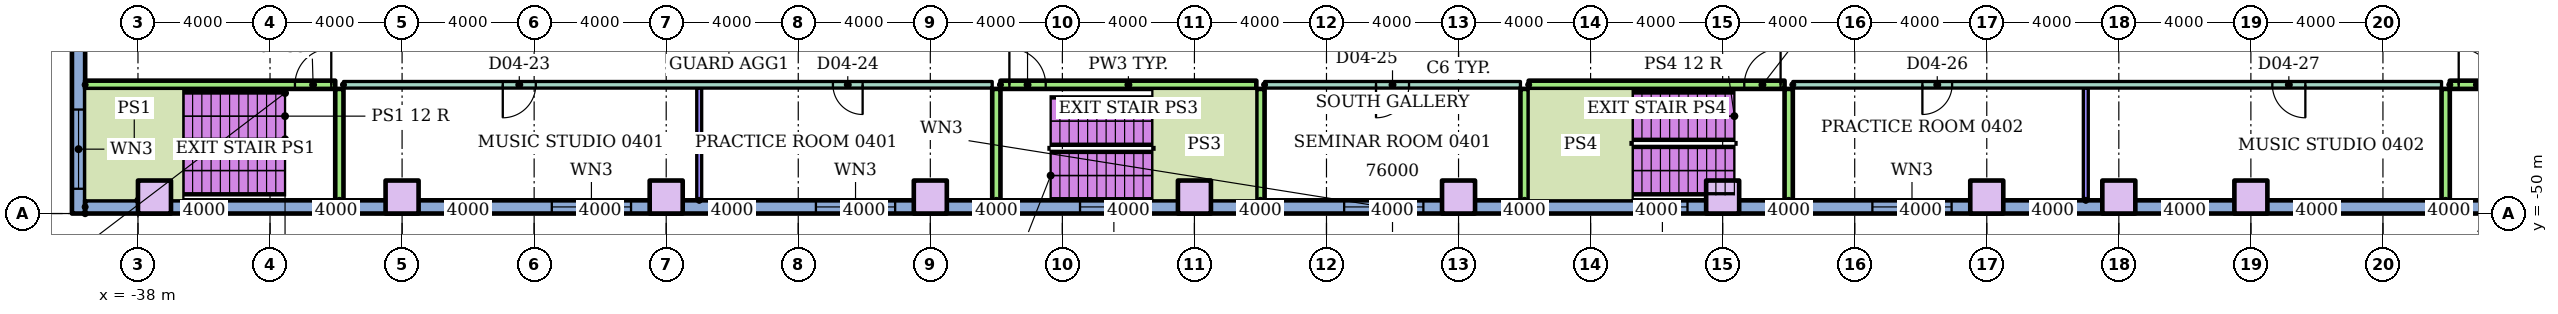
"""IFC4 building model, lengths in metres.
Left out: names, types, materials, properties, quantities, classifications, styles, units other than length and angle.
Written with IfcOpenShell. Run it as: python <this file> out.ifc"""

import sys

from ifc_helpers import new_model, si_unit, direction, frame, frame_2d, origin, origin_2d, place, context, subcontext, project, spatial, rectangle, extrude, element, fill, save


model = new_model("IFC4")
c1 = context("Model", 3, precision=1e-05, world=origin(), true_north=direction((0.0, 1.0)))
c2 = subcontext(c1, "Body", "Model", "MODEL_VIEW")
j1 = project(units=[si_unit("LENGTHUNIT", "METRE"), si_unit("PLANEANGLEUNIT", "RADIAN")], contexts=[c1])
p1 = place(None, origin())
s1 = spatial("IfcSite", under=j1, at=p1, CompositionType="ELEMENT")
p2 = place(p1, origin())
s2 = spatial("IfcBuilding", under=s1, at=p2, CompositionType="ELEMENT")
p3 = place(p2, frame((0.0, 0.0, 18.0)))
s3 = spatial("IfcBuildingStorey", under=s2, at=p3, CompositionType="ELEMENT", Elevation=18.0)
for number, where in (
    (1, (-37.5, -49.5, 0.0)),
    (2, (-30.0, -49.5, 0.0)),
    (3, (-22.0, -49.5, 0.0)),
    (4, (-14.0, -49.5, 0.0)),
    (5, (-6.0, -49.5, 0.0)),
    (6, (2.0, -49.5, 0.0)),
    (7, (10.0, -49.5, 0.0)),
    (8, (18.0, -49.5, 0.0)),
    (9, (22.0, -49.5, 0.0)),
    (10, (26.0, -49.5, 0.0)),
):
    element("IfcColumn", number, at=place(p3, frame(where)), inside=s3, PredefinedType="COLUMN", context=c2, shape_type="SweptSolid", body=[
        extrude(rectangle(XDim=1.0, YDim=1.0, at=origin_2d()), origin(), (0.0, 0.0, 1.0), 4.0),
    ])
p4 = place(p3, frame((-39.8, 20.0, 0.0), z_axis=(0.0, 0.0, 1.0), x_axis=(0.0, -1.0, 0.0)))
e11 = element("IfcWall", 11, at=p4, inside=s3, PredefinedType="STANDARD", context=c2, shape_type="SweptSolid", body=[
    extrude(rectangle(XDim=70.0, YDim=0.4, at=frame_2d((35.0, 0.0))), origin(), (0.0, 0.0, 1.0), 3.7),
])
p5 = place(p4, frame((1.05, 0.0, 0.9)))
e12 = element("IfcOpeningElement", 12, at=p5, cuts=e11, PredefinedType="OPENING", context=c2, shape_type="SweptSolid", body=[
    extrude(rectangle(XDim=2.4, YDim=2.1, at=frame_2d((1.2, 1.05))), frame((0.0, 0.21, 0.0), z_axis=(0.0, -1.0, 0.0), x_axis=(1.0, 0.0, 0.0)), (0.0, 0.0, 1.0), 0.42),
])
p6 = place(p4, frame((5.55, 0.0, 0.9)))
e13 = element("IfcOpeningElement", 13, at=p6, cuts=e11, PredefinedType="OPENING", context=c2, shape_type="SweptSolid", body=[
    extrude(rectangle(XDim=2.4, YDim=2.1, at=frame_2d((1.2, 1.05))), frame((0.0, 0.21, 0.0), z_axis=(0.0, -1.0, 0.0), x_axis=(1.0, 0.0, 0.0)), (0.0, 0.0, 1.0), 0.42),
])
p7 = place(p4, frame((9.863, 0.0, 0.9)))
e14 = element("IfcOpeningElement", 14, at=p7, cuts=e11, PredefinedType="OPENING", context=c2, shape_type="SweptSolid", body=[
    extrude(rectangle(XDim=2.4, YDim=2.1, at=frame_2d((1.2, 1.05))), frame((0.0, 0.21, 0.0), z_axis=(0.0, -1.0, 0.0), x_axis=(1.0, 0.0, 0.0)), (0.0, 0.0, 1.0), 0.42),
])
p8 = place(p4, frame((13.988, 0.0, 0.9)))
e15 = element("IfcOpeningElement", 15, at=p8, cuts=e11, PredefinedType="OPENING", context=c2, shape_type="SweptSolid", body=[
    extrude(rectangle(XDim=2.4, YDim=2.1, at=frame_2d((1.2, 1.05))), frame((0.0, 0.21, 0.0), z_axis=(0.0, -1.0, 0.0), x_axis=(1.0, 0.0, 0.0)), (0.0, 0.0, 1.0), 0.42),
])
p9 = place(p4, frame((18.113, 0.0, 0.9)))
e16 = element("IfcOpeningElement", 16, at=p9, cuts=e11, PredefinedType="OPENING", context=c2, shape_type="SweptSolid", body=[
    extrude(rectangle(XDim=2.4, YDim=2.1, at=frame_2d((1.2, 1.05))), frame((0.0, 0.21, 0.0), z_axis=(0.0, -1.0, 0.0), x_axis=(1.0, 0.0, 0.0)), (0.0, 0.0, 1.0), 0.42),
])
p10 = place(p4, frame((22.238, 0.0, 0.9)))
e17 = element("IfcOpeningElement", 17, at=p10, cuts=e11, PredefinedType="OPENING", context=c2, shape_type="SweptSolid", body=[
    extrude(rectangle(XDim=2.4, YDim=2.1, at=frame_2d((1.2, 1.05))), frame((0.0, 0.21, 0.0), z_axis=(0.0, -1.0, 0.0), x_axis=(1.0, 0.0, 0.0)), (0.0, 0.0, 1.0), 0.42),
])
p11 = place(p4, frame((26.363, 0.0, 0.9)))
e18 = element("IfcOpeningElement", 18, at=p11, cuts=e11, PredefinedType="OPENING", context=c2, shape_type="SweptSolid", body=[
    extrude(rectangle(XDim=2.4, YDim=2.1, at=frame_2d((1.2, 1.05))), frame((0.0, 0.21, 0.0), z_axis=(0.0, -1.0, 0.0), x_axis=(1.0, 0.0, 0.0)), (0.0, 0.0, 1.0), 0.42),
])
p12 = place(p4, frame((30.488, 0.0, 0.9)))
e19 = element("IfcOpeningElement", 19, at=p12, cuts=e11, PredefinedType="OPENING", context=c2, shape_type="SweptSolid", body=[
    extrude(rectangle(XDim=2.4, YDim=2.1, at=frame_2d((1.2, 1.05))), frame((0.0, 0.21, 0.0), z_axis=(0.0, -1.0, 0.0), x_axis=(1.0, 0.0, 0.0)), (0.0, 0.0, 1.0), 0.42),
])
p13 = place(p4, frame((34.613, 0.0, 0.9)))
e20 = element("IfcOpeningElement", 20, at=p13, cuts=e11, PredefinedType="OPENING", context=c2, shape_type="SweptSolid", body=[
    extrude(rectangle(XDim=2.4, YDim=2.1, at=frame_2d((1.2, 1.05))), frame((0.0, 0.21, 0.0), z_axis=(0.0, -1.0, 0.0), x_axis=(1.0, 0.0, 0.0)), (0.0, 0.0, 1.0), 0.42),
])
p14 = place(p4, frame((38.738, 0.0, 0.9)))
e21 = element("IfcOpeningElement", 21, at=p14, cuts=e11, PredefinedType="OPENING", context=c2, shape_type="SweptSolid", body=[
    extrude(rectangle(XDim=2.4, YDim=2.1, at=frame_2d((1.2, 1.05))), frame((0.0, 0.21, 0.0), z_axis=(0.0, -1.0, 0.0), x_axis=(1.0, 0.0, 0.0)), (0.0, 0.0, 1.0), 0.42),
])
p15 = place(p4, frame((54.05, 0.0, 0.9)))
e22 = element("IfcOpeningElement", 22, at=p15, cuts=e11, PredefinedType="OPENING", context=c2, shape_type="SweptSolid", body=[
    extrude(rectangle(XDim=2.4, YDim=2.1, at=frame_2d((1.2, 1.05))), frame((0.0, 0.21, 0.0), z_axis=(0.0, -1.0, 0.0), x_axis=(1.0, 0.0, 0.0)), (0.0, 0.0, 1.0), 0.42),
])
p16 = place(p4, frame((57.55, 0.0, 0.9)))
e23 = element("IfcOpeningElement", 23, at=p16, cuts=e11, PredefinedType="OPENING", context=c2, shape_type="SweptSolid", body=[
    extrude(rectangle(XDim=2.4, YDim=2.1, at=frame_2d((1.2, 1.05))), frame((0.0, 0.21, 0.0), z_axis=(0.0, -1.0, 0.0), x_axis=(1.0, 0.0, 0.0)), (0.0, 0.0, 1.0), 0.42),
])
p17 = place(p4, frame((61.05, 0.0, 0.9)))
e24 = element("IfcOpeningElement", 24, at=p17, cuts=e11, PredefinedType="OPENING", context=c2, shape_type="SweptSolid", body=[
    extrude(rectangle(XDim=2.4, YDim=2.1, at=frame_2d((1.2, 1.05))), frame((0.0, 0.21, 0.0), z_axis=(0.0, -1.0, 0.0), x_axis=(1.0, 0.0, 0.0)), (0.0, 0.0, 1.0), 0.42),
])
p18 = place(p4, frame((66.85, 0.0, 0.9)))
e25 = element("IfcOpeningElement", 25, at=p18, cuts=e11, PredefinedType="OPENING", context=c2, shape_type="SweptSolid", body=[
    extrude(rectangle(XDim=2.4, YDim=2.1, at=frame_2d((1.2, 1.05))), frame((0.0, 0.21, 0.0), z_axis=(0.0, -1.0, 0.0), x_axis=(1.0, 0.0, 0.0)), (0.0, 0.0, 1.0), 0.42),
])
p19 = place(p3, frame((-39.6, -49.8, 0.0)))
e26 = element("IfcWall", 26, at=p19, inside=s3, PredefinedType="STANDARD", context=c2, shape_type="SweptSolid", body=[
    extrude(rectangle(XDim=79.2, YDim=0.4, at=frame_2d((39.6, 0.0))), origin(), (0.0, 0.0, 1.0), 3.7),
])
p20 = place(p19, frame((14.135, 0.0, 0.9)))
e27 = element("IfcOpeningElement", 27, at=p20, cuts=e26, PredefinedType="OPENING", context=c2, shape_type="SweptSolid", body=[
    extrude(rectangle(XDim=2.4, YDim=2.1, at=frame_2d((1.2, 1.05))), frame((0.0, 0.21, 0.0), z_axis=(0.0, -1.0, 0.0), x_axis=(1.0, 0.0, 0.0)), (0.0, 0.0, 1.0), 0.42),
])
p21 = place(p19, frame((22.135, 0.0, 0.9)))
e28 = element("IfcOpeningElement", 28, at=p21, cuts=e26, PredefinedType="OPENING", context=c2, shape_type="SweptSolid", body=[
    extrude(rectangle(XDim=2.4, YDim=2.1, at=frame_2d((1.2, 1.05))), frame((0.0, 0.21, 0.0), z_axis=(0.0, -1.0, 0.0), x_axis=(1.0, 0.0, 0.0)), (0.0, 0.0, 1.0), 0.42),
])
p22 = place(p19, frame((30.135, 0.0, 0.9)))
e29 = element("IfcOpeningElement", 29, at=p22, cuts=e26, PredefinedType="OPENING", context=c2, shape_type="SweptSolid", body=[
    extrude(rectangle(XDim=2.05, YDim=2.1, at=frame_2d((1.025, 1.05))), frame((0.0, 0.21, 0.0), z_axis=(0.0, -1.0, 0.0), x_axis=(1.0, 0.0, 0.0)), (0.0, 0.0, 1.0), 0.42),
])
p23 = place(p19, frame((38.135, 0.0, 0.9)))
e30 = element("IfcOpeningElement", 30, at=p23, cuts=e26, PredefinedType="OPENING", context=c2, shape_type="SweptSolid", body=[
    extrude(rectangle(XDim=2.4, YDim=2.1, at=frame_2d((1.2, 1.05))), frame((0.0, 0.21, 0.0), z_axis=(0.0, -1.0, 0.0), x_axis=(1.0, 0.0, 0.0)), (0.0, 0.0, 1.0), 0.42),
])
p24 = place(p19, frame((47.015, 0.0, 0.9)))
e31 = element("IfcOpeningElement", 31, at=p24, cuts=e26, PredefinedType="OPENING", context=c2, shape_type="SweptSolid", body=[
    extrude(rectangle(XDim=1.52, YDim=2.1, at=frame_2d((0.76, 1.05))), frame((0.0, 0.21, 0.0), z_axis=(0.0, -1.0, 0.0), x_axis=(1.0, 0.0, 0.0)), (0.0, 0.0, 1.0), 0.42),
])
p25 = place(p19, frame((54.135, 0.0, 0.9)))
e32 = element("IfcOpeningElement", 32, at=p25, cuts=e26, PredefinedType="OPENING", context=c2, shape_type="SweptSolid", body=[
    extrude(rectangle(XDim=2.4, YDim=2.1, at=frame_2d((1.2, 1.05))), frame((0.0, 0.21, 0.0), z_axis=(0.0, -1.0, 0.0), x_axis=(1.0, 0.0, 0.0)), (0.0, 0.0, 1.0), 0.42),
])
p26 = place(p3, frame((-31.775, -46.1, 0.0)))
e33 = element("IfcWall", 33, at=p26, inside=s3, PredefinedType="PARTITIONING", context=c2, shape_type="SweptSolid", body=[
    extrude(rectangle(XDim=19.65, YDim=0.2, at=frame_2d((9.825, 0.0))), origin(), (0.0, 0.0, 1.0), 3.7),
])
p27 = place(p26, frame((4.825, 0.0, 0.0)))
e34 = element("IfcOpeningElement", 34, at=p27, cuts=e33, PredefinedType="OPENING", context=c2, shape_type="SweptSolid", body=[
    extrude(rectangle(XDim=1.0, YDim=2.1, at=frame_2d((0.5, 1.05))), frame((0.0, 0.11, 0.0), z_axis=(0.0, -1.0, 0.0), x_axis=(1.0, 0.0, 0.0)), (0.0, 0.0, 1.0), 0.22),
])
p28 = place(p26, frame((14.825, 0.0, 0.0)))
e35 = element("IfcOpeningElement", 35, at=p28, cuts=e33, PredefinedType="OPENING", context=c2, shape_type="SweptSolid", body=[
    extrude(rectangle(XDim=0.9, YDim=2.1, at=frame_2d((0.45, 1.05))), frame((0.0, 0.11, 0.0), z_axis=(0.0, -1.0, 0.0), x_axis=(1.0, 0.0, 0.0)), (0.0, 0.0, 1.0), 0.22),
])
p29 = place(p3, frame((-3.875, -46.1, 0.0)))
e36 = element("IfcWall", 36, at=p29, inside=s3, PredefinedType="PARTITIONING", context=c2, shape_type="SweptSolid", body=[
    extrude(rectangle(XDim=7.75, YDim=0.2, at=frame_2d((3.875, 0.0))), origin(), (0.0, 0.0, 1.0), 3.7),
])
p30 = place(p29, frame((3.375, 0.0, 0.0)))
e37 = element("IfcOpeningElement", 37, at=p30, cuts=e36, PredefinedType="OPENING", context=c2, shape_type="SweptSolid", body=[
    extrude(rectangle(XDim=1.0, YDim=2.1, at=frame_2d((0.5, 1.05))), frame((0.0, 0.11, 0.0), z_axis=(0.0, -1.0, 0.0), x_axis=(1.0, 0.0, 0.0)), (0.0, 0.0, 1.0), 0.22),
])
p31 = place(p3, frame((12.125, -46.1, 0.0)))
e38 = element("IfcWall", 38, at=p31, inside=s3, PredefinedType="PARTITIONING", context=c2, shape_type="SweptSolid", body=[
    extrude(rectangle(XDim=19.65, YDim=0.2, at=frame_2d((9.825, 0.0))), origin(), (0.0, 0.0, 1.0), 3.7),
])
p32 = place(p31, frame((3.925, 0.0, 0.0)))
e39 = element("IfcOpeningElement", 39, at=p32, cuts=e38, PredefinedType="OPENING", context=c2, shape_type="SweptSolid", body=[
    extrude(rectangle(XDim=0.9, YDim=2.1, at=frame_2d((0.45, 1.05))), frame((0.0, 0.11, 0.0), z_axis=(0.0, -1.0, 0.0), x_axis=(1.0, 0.0, 0.0)), (0.0, 0.0, 1.0), 0.22),
])
p33 = place(p31, frame((14.525, 0.0, 0.0)))
e40 = element("IfcOpeningElement", 40, at=p33, cuts=e38, PredefinedType="OPENING", context=c2, shape_type="SweptSolid", body=[
    extrude(rectangle(XDim=1.0, YDim=2.1, at=frame_2d((0.5, 1.05))), frame((0.0, 0.11, 0.0), z_axis=(0.0, -1.0, 0.0), x_axis=(1.0, 0.0, 0.0)), (0.0, 0.0, 1.0), 0.22),
])
p34 = place(p3, frame((-39.6, -46.1, 0.0)))
e41 = element("IfcWall", 41, at=p34, inside=s3, PredefinedType="SOLIDWALL", context=c2, shape_type="SweptSolid", body=[
    extrude(rectangle(XDim=7.575, YDim=0.25, at=frame_2d((3.788, 0.0))), origin(), (0.0, 0.0, 1.0), 3.7),
])
p35 = place(p34, frame((6.355, 0.0, 0.0)))
e42 = element("IfcOpeningElement", 42, at=p35, cuts=e41, PredefinedType="OPENING", context=c2, shape_type="SweptSolid", body=[
    extrude(rectangle(XDim=1.1, YDim=2.1, at=frame_2d((0.55, 1.05))), frame((0.0, 0.135, 0.0), z_axis=(0.0, -1.0, 0.0), x_axis=(1.0, 0.0, 0.0)), (0.0, 0.0, 1.0), 0.27),
])
p36 = place(p3, frame((-11.875, -46.1, 0.0)))
e43 = element("IfcWall", 43, at=p36, inside=s3, PredefinedType="SOLIDWALL", context=c2, shape_type="SweptSolid", body=[
    extrude(rectangle(XDim=7.75, YDim=0.25, at=frame_2d((3.875, 0.0))), origin(), (0.0, 0.0, 1.0), 3.7),
])
p37 = place(p36, frame((0.27, 0.0, 0.0)))
e44 = element("IfcOpeningElement", 44, at=p37, cuts=e43, PredefinedType="OPENING", context=c2, shape_type="SweptSolid", body=[
    extrude(rectangle(XDim=1.1, YDim=2.1, at=frame_2d((0.55, 1.05))), frame((0.0, 0.135, 0.0), z_axis=(0.0, -1.0, 0.0), x_axis=(1.0, 0.0, 0.0)), (0.0, 0.0, 1.0), 0.27),
])
p38 = place(p3, frame((4.125, -46.1, 0.0)))
e45 = element("IfcWall", 45, at=p38, inside=s3, PredefinedType="SOLIDWALL", context=c2, shape_type="SweptSolid", body=[
    extrude(rectangle(XDim=7.75, YDim=0.25, at=frame_2d((3.875, 0.0))), origin(), (0.0, 0.0, 1.0), 3.7),
])
p39 = place(p38, frame((6.53, 0.0, 0.0)))
e46 = element("IfcOpeningElement", 46, at=p39, cuts=e45, PredefinedType="OPENING", context=c2, shape_type="SweptSolid", body=[
    extrude(rectangle(XDim=1.1, YDim=2.1, at=frame_2d((0.55, 1.05))), frame((0.0, 0.135, 0.0), z_axis=(0.0, -1.0, 0.0), x_axis=(1.0, 0.0, 0.0)), (0.0, 0.0, 1.0), 0.27),
])
p40 = place(p3, frame((32.025, -46.1, 0.0)))
e47 = element("IfcWall", 47, at=p40, inside=s3, PredefinedType="SOLIDWALL", context=c2, shape_type="SweptSolid", body=[
    extrude(rectangle(XDim=7.575, YDim=0.25, at=frame_2d((3.788, 0.0))), origin(), (0.0, 0.0, 1.0), 3.7),
])
p41 = place(p40, frame((0.27, 0.0, 0.0)))
e48 = element("IfcOpeningElement", 48, at=p41, cuts=e47, PredefinedType="OPENING", context=c2, shape_type="SweptSolid", body=[
    extrude(rectangle(XDim=1.1, YDim=2.1, at=frame_2d((0.55, 1.05))), frame((0.0, 0.135, 0.0), z_axis=(0.0, -1.0, 0.0), x_axis=(1.0, 0.0, 0.0)), (0.0, 0.0, 1.0), 0.27),
])
p42 = place(p3, frame((-31.9, -49.6, 0.0), z_axis=(0.0, 0.0, 1.0), x_axis=(0.0, 1.0, 0.0)))
e49 = element("IfcWall", 49, at=p42, inside=s3, PredefinedType="SOLIDWALL", context=c2, shape_type="SweptSolid", body=[
    extrude(rectangle(XDim=3.375, YDim=0.25, at=frame_2d((1.688, 0.0))), origin(), (0.0, 0.0, 1.0), 3.7),
])
p43 = place(p3, frame((-21.0, -49.6, 0.0), z_axis=(0.0, 0.0, 1.0), x_axis=(0.0, 1.0, 0.0)))
e50 = element("IfcWall", 50, at=p43, inside=s3, PredefinedType="PARTITIONING", context=c2, shape_type="SweptSolid", body=[
    extrude(rectangle(XDim=3.4, YDim=0.15, at=frame_2d((1.7, 0.0))), origin(), (0.0, 0.0, 1.0), 3.7),
])
for number, where, z_axis, x_axis in (
    (51, (-12.0, -49.6, 0.0), (0.0, 0.0, 1.0), (0.0, 1.0, 0.0)),
    (52, (-4.0, -49.6, 0.0), (0.0, 0.0, 1.0), (0.0, 1.0, 0.0)),
    (53, (4.0, -49.6, 0.0), (0.0, 0.0, 1.0), (0.0, 1.0, 0.0)),
    (54, (12.0, -49.6, 0.0), (0.0, 0.0, 1.0), (0.0, 1.0, 0.0)),
):
    element("IfcWall", number, at=place(p3, frame(where, z_axis=z_axis, x_axis=x_axis)), inside=s3, PredefinedType="SOLIDWALL", context=c2, shape_type="SweptSolid", body=[
        extrude(rectangle(XDim=3.375, YDim=0.25, at=frame_2d((1.688, 0.0))), origin(), (0.0, 0.0, 1.0), 3.7),
    ])
p44 = place(p3, frame((21.0, -49.6, 0.0), z_axis=(0.0, 0.0, 1.0), x_axis=(0.0, 1.0, 0.0)))
e55 = element("IfcWall", 55, at=p44, inside=s3, PredefinedType="PARTITIONING", context=c2, shape_type="SweptSolid", body=[
    extrude(rectangle(XDim=3.4, YDim=0.15, at=frame_2d((1.7, 0.0))), origin(), (0.0, 0.0, 1.0), 3.7),
])
p45 = place(p3, frame((31.9, -49.6, 0.0), z_axis=(0.0, 0.0, 1.0), x_axis=(0.0, 1.0, 0.0)))
e56 = element("IfcWall", 56, at=p45, inside=s3, PredefinedType="SOLIDWALL", context=c2, shape_type="SweptSolid", body=[
    extrude(rectangle(XDim=3.375, YDim=0.25, at=frame_2d((1.688, 0.0))), origin(), (0.0, 0.0, 1.0), 3.7),
])
p46 = place(p18, origin())
e57 = element("IfcWindow", 57, at=p46, inside=s3, PartitioningType="SINGLE_PANEL", PredefinedType="WINDOW", context=c2, shape_type="SweptSolid", body=[
    extrude(rectangle(XDim=2.4, YDim=2.1, at=frame_2d((1.2, 1.05))), frame((0.0, 0.03, 0.0), z_axis=(0.0, -1.0, 0.0), x_axis=(1.0, 0.0, 0.0)), (0.0, 0.0, 1.0), 0.06),
])
fill(e25, e57)
p47 = place(p20, origin())
e58 = element("IfcWindow", 58, at=p47, inside=s3, PartitioningType="SINGLE_PANEL", PredefinedType="WINDOW", context=c2, shape_type="SweptSolid", body=[
    extrude(rectangle(XDim=2.4, YDim=2.1, at=frame_2d((1.2, 1.05))), frame((0.0, 0.03, 0.0), z_axis=(0.0, -1.0, 0.0), x_axis=(1.0, 0.0, 0.0)), (0.0, 0.0, 1.0), 0.06),
])
fill(e27, e58)
p48 = place(p21, origin())
e59 = element("IfcWindow", 59, at=p48, inside=s3, PartitioningType="SINGLE_PANEL", PredefinedType="WINDOW", context=c2, shape_type="SweptSolid", body=[
    extrude(rectangle(XDim=2.4, YDim=2.1, at=frame_2d((1.2, 1.05))), frame((0.0, 0.03, 0.0), z_axis=(0.0, -1.0, 0.0), x_axis=(1.0, 0.0, 0.0)), (0.0, 0.0, 1.0), 0.06),
])
fill(e28, e59)
p49 = place(p22, origin())
e60 = element("IfcWindow", 60, at=p49, inside=s3, PartitioningType="SINGLE_PANEL", PredefinedType="WINDOW", context=c2, shape_type="SweptSolid", body=[
    extrude(rectangle(XDim=2.05, YDim=2.1, at=frame_2d((1.025, 1.05))), frame((0.0, 0.03, 0.0), z_axis=(0.0, -1.0, 0.0), x_axis=(1.0, 0.0, 0.0)), (0.0, 0.0, 1.0), 0.06),
])
fill(e29, e60)
p50 = place(p23, origin())
e61 = element("IfcWindow", 61, at=p50, inside=s3, PartitioningType="SINGLE_PANEL", PredefinedType="WINDOW", context=c2, shape_type="SweptSolid", body=[
    extrude(rectangle(XDim=2.4, YDim=2.1, at=frame_2d((1.2, 1.05))), frame((0.0, 0.03, 0.0), z_axis=(0.0, -1.0, 0.0), x_axis=(1.0, 0.0, 0.0)), (0.0, 0.0, 1.0), 0.06),
])
fill(e30, e61)
p51 = place(p24, origin())
e62 = element("IfcWindow", 62, at=p51, inside=s3, PartitioningType="SINGLE_PANEL", PredefinedType="WINDOW", context=c2, shape_type="SweptSolid", body=[
    extrude(rectangle(XDim=1.52, YDim=2.1, at=frame_2d((0.76, 1.05))), frame((0.0, 0.03, 0.0), z_axis=(0.0, -1.0, 0.0), x_axis=(1.0, 0.0, 0.0)), (0.0, 0.0, 1.0), 0.06),
])
fill(e31, e62)
p52 = place(p25, origin())
e63 = element("IfcWindow", 63, at=p52, inside=s3, PartitioningType="SINGLE_PANEL", PredefinedType="WINDOW", context=c2, shape_type="SweptSolid", body=[
    extrude(rectangle(XDim=2.4, YDim=2.1, at=frame_2d((1.2, 1.05))), frame((0.0, 0.03, 0.0), z_axis=(0.0, -1.0, 0.0), x_axis=(1.0, 0.0, 0.0)), (0.0, 0.0, 1.0), 0.06),
])
fill(e32, e63)
p53 = place(p27, frame((1.0, 0.0, 0.0), z_axis=(0.0, 0.0, 1.0), x_axis=(-1.0, 0.0, 0.0)))
e64 = element("IfcDoor", 64, at=p53, inside=s3, OperationType="SINGLE_SWING_LEFT", PredefinedType="DOOR", context=c2, shape_type="SweptSolid", body=[
    extrude(rectangle(XDim=1.0, YDim=2.1, at=frame_2d((0.5, 1.05))), frame((0.0, 0.025, 0.0), z_axis=(0.0, -1.0, 0.0), x_axis=(1.0, 0.0, 0.0)), (0.0, 0.0, 1.0), 0.05),
])
fill(e34, e64)
p54 = place(p28, frame((0.9, 0.0, 0.0), z_axis=(0.0, 0.0, 1.0), x_axis=(-1.0, 0.0, 0.0)))
e65 = element("IfcDoor", 65, at=p54, inside=s3, OperationType="SINGLE_SWING_RIGHT", PredefinedType="DOOR", context=c2, shape_type="SweptSolid", body=[
    extrude(rectangle(XDim=0.9, YDim=2.1, at=frame_2d((0.45, 1.05))), frame((0.0, 0.025, 0.0), z_axis=(0.0, -1.0, 0.0), x_axis=(1.0, 0.0, 0.0)), (0.0, 0.0, 1.0), 0.05),
])
fill(e35, e65)
p55 = place(p30, frame((1.0, 0.0, 0.0), z_axis=(0.0, 0.0, 1.0), x_axis=(-1.0, 0.0, 0.0)))
e66 = element("IfcDoor", 66, at=p55, inside=s3, OperationType="SINGLE_SWING_LEFT", PredefinedType="DOOR", context=c2, shape_type="SweptSolid", body=[
    extrude(rectangle(XDim=1.0, YDim=2.1, at=frame_2d((0.5, 1.05))), frame((0.0, 0.025, 0.0), z_axis=(0.0, -1.0, 0.0), x_axis=(1.0, 0.0, 0.0)), (0.0, 0.0, 1.0), 0.05),
])
fill(e37, e66)
p56 = place(p32, frame((0.9, 0.0, 0.0), z_axis=(0.0, 0.0, 1.0), x_axis=(-1.0, 0.0, 0.0)))
e67 = element("IfcDoor", 67, at=p56, inside=s3, OperationType="SINGLE_SWING_LEFT", PredefinedType="DOOR", context=c2, shape_type="SweptSolid", body=[
    extrude(rectangle(XDim=0.9, YDim=2.1, at=frame_2d((0.45, 1.05))), frame((0.0, 0.025, 0.0), z_axis=(0.0, -1.0, 0.0), x_axis=(1.0, 0.0, 0.0)), (0.0, 0.0, 1.0), 0.05),
])
fill(e39, e67)
p57 = place(p33, frame((1.0, 0.0, 0.0), z_axis=(0.0, 0.0, 1.0), x_axis=(-1.0, 0.0, 0.0)))
e68 = element("IfcDoor", 68, at=p57, inside=s3, OperationType="SINGLE_SWING_RIGHT", PredefinedType="DOOR", context=c2, shape_type="SweptSolid", body=[
    extrude(rectangle(XDim=1.0, YDim=2.1, at=frame_2d((0.5, 1.05))), frame((0.0, 0.025, 0.0), z_axis=(0.0, -1.0, 0.0), x_axis=(1.0, 0.0, 0.0)), (0.0, 0.0, 1.0), 0.05),
])
fill(e40, e68)
p58 = place(p35, origin())
e69 = element("IfcDoor", 69, at=p58, inside=s3, OperationType="SINGLE_SWING_RIGHT", PredefinedType="DOOR", context=c2, shape_type="SweptSolid", body=[
    extrude(rectangle(XDim=1.1, YDim=2.1, at=frame_2d((0.55, 1.05))), frame((0.0, 0.025, 0.0), z_axis=(0.0, -1.0, 0.0), x_axis=(1.0, 0.0, 0.0)), (0.0, 0.0, 1.0), 0.05),
])
fill(e42, e69)
p59 = place(p41, origin())
e70 = element("IfcDoor", 70, at=p59, inside=s3, OperationType="SINGLE_SWING_LEFT", PredefinedType="DOOR", context=c2, shape_type="SweptSolid", body=[
    extrude(rectangle(XDim=1.1, YDim=2.1, at=frame_2d((0.55, 1.05))), frame((0.0, 0.025, 0.0), z_axis=(0.0, -1.0, 0.0), x_axis=(1.0, 0.0, 0.0)), (0.0, 0.0, 1.0), 0.05),
])
fill(e48, e70)
p60 = place(p37, origin())
e71 = element("IfcDoor", 71, at=p60, inside=s3, OperationType="SINGLE_SWING_LEFT", PredefinedType="DOOR", context=c2, shape_type="SweptSolid", body=[
    extrude(rectangle(XDim=1.1, YDim=2.1, at=frame_2d((0.55, 1.05))), frame((0.0, 0.025, 0.0), z_axis=(0.0, -1.0, 0.0), x_axis=(1.0, 0.0, 0.0)), (0.0, 0.0, 1.0), 0.05),
])
fill(e44, e71)
p61 = place(p39, origin())
e72 = element("IfcDoor", 72, at=p61, inside=s3, OperationType="SINGLE_SWING_RIGHT", PredefinedType="DOOR", context=c2, shape_type="SweptSolid", body=[
    extrude(rectangle(XDim=1.1, YDim=2.1, at=frame_2d((0.55, 1.05))), frame((0.0, 0.025, 0.0), z_axis=(0.0, -1.0, 0.0), x_axis=(1.0, 0.0, 0.0)), (0.0, 0.0, 1.0), 0.05),
])
fill(e46, e72)
save(model, sys.argv[1])
